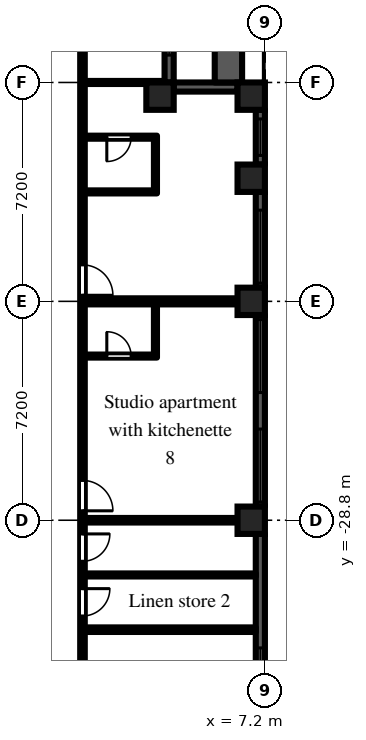
"""IFC4 building model, lengths in metres.
Left out: names, types, materials, properties, quantities, classifications, styles, units other than length and angle.
Written with IfcOpenShell. Run it as: python <this file> out.ifc"""

import sys

from ifc_helpers import new_model, si_unit, direction, frame, frame_2d, origin, origin_2d, place, context, subcontext, project, spatial, rectangle, extrude, element, fill, save


model = new_model("IFC4")
c1 = context("Model", 3, precision=1e-05, world=origin(), true_north=direction((0.0, 1.0)))
c2 = subcontext(c1, "Body", "Model", "MODEL_VIEW")
j1 = project(units=[si_unit("LENGTHUNIT", "METRE"), si_unit("PLANEANGLEUNIT", "RADIAN")], contexts=[c1])
p1 = place(None, origin())
s1 = spatial("IfcSite", under=j1, at=p1, CompositionType="ELEMENT")
p2 = place(p1, origin())
s2 = spatial("IfcBuilding", under=s1, at=p2, CompositionType="ELEMENT")
p3 = place(p2, frame((0.0, 0.0, 35.7)))
s3 = spatial("IfcBuildingStorey", under=s2, at=p3, CompositionType="ELEMENT", Elevation=35.7)
for number, where, z_axis, x_axis in (
    (1, (3.75, -14.85, 0.0), (0.0, 0.0, 1.0), (1.0, 0.0, 0.0)),
    (2, (6.75, -28.8, 0.0), (0.0, 0.0, 1.0), (1.0, 0.0, 0.0)),
    (3, (6.75, -21.6, 0.0), (0.0, 0.0, 1.0), (1.0, 0.0, 0.0)),
    (4, (6.75, -17.55, 0.0), (0.0, 0.0, 1.0), (1.0, 0.0, 0.0)),
    (5, (6.75, -14.85, 0.0), (0.0, 0.0, 1.0), (1.0, 0.0, 0.0)),
):
    element("IfcColumn", number, at=place(p3, frame(where, z_axis=z_axis, x_axis=x_axis)), inside=s3, PredefinedType="COLUMN", context=c2, shape_type="SweptSolid", body=[
        extrude(rectangle(XDim=0.9, YDim=0.9, at=origin_2d()), origin(), (0.0, 0.0, 1.0), 3.0),
    ])
p4 = place(p3, frame((7.05, -35.55, 0.0), z_axis=(0.0, 0.0, 1.0), x_axis=(0.0, 1.0, 0.0)))
e6 = element("IfcWall", 6, at=p4, inside=s3, PredefinedType="SOLIDWALL", context=c2, shape_type="SweptSolid", body=[
    extrude(rectangle(XDim=6.3, YDim=0.3, at=frame_2d((3.15, 0.0))), origin(), (0.0, 0.0, 1.0), 2.1),
])
p5 = place(p4, frame((0.15, 0.0, 0.2)))
e7 = element("IfcOpeningElement", 7, at=p5, cuts=e6, PredefinedType="OPENING", context=c2, shape_type="SweptSolid", body=[
    extrude(rectangle(XDim=2.4, YDim=1.85, at=frame_2d((1.2, 0.925))), frame((0.0, 0.16, 0.0), z_axis=(0.0, -1.0, 0.0), x_axis=(1.0, 0.0, 0.0)), (0.0, 0.0, 1.0), 0.32),
])
p6 = place(p3, frame((7.05, -28.35, 0.0), z_axis=(0.0, 0.0, 1.0), x_axis=(0.0, 1.0, 0.0)))
e8 = element("IfcWall", 8, at=p6, inside=s3, PredefinedType="SOLIDWALL", context=c2, shape_type="SweptSolid", body=[
    extrude(rectangle(XDim=6.3, YDim=0.3, at=frame_2d((3.15, 0.0))), origin(), (0.0, 0.0, 1.0), 2.1),
])
p7 = place(p6, frame((0.15, 0.0, 0.2)))
e9 = element("IfcOpeningElement", 9, at=p7, cuts=e8, PredefinedType="OPENING", context=c2, shape_type="SweptSolid", body=[
    extrude(rectangle(XDim=2.4, YDim=1.85, at=frame_2d((1.2, 0.925))), frame((0.0, 0.16, 0.0), z_axis=(0.0, -1.0, 0.0), x_axis=(1.0, 0.0, 0.0)), (0.0, 0.0, 1.0), 0.32),
])
p8 = place(p6, frame((3.75, 0.0, 0.2)))
e10 = element("IfcOpeningElement", 10, at=p8, cuts=e8, PredefinedType="OPENING", context=c2, shape_type="SweptSolid", body=[
    extrude(rectangle(XDim=2.4, YDim=1.85, at=frame_2d((1.2, 0.925))), frame((0.0, 0.16, 0.0), z_axis=(0.0, -1.0, 0.0), x_axis=(1.0, 0.0, 0.0)), (0.0, 0.0, 1.0), 0.32),
])
p9 = place(p3, frame((7.05, -21.15, 0.0), z_axis=(0.0, 0.0, 1.0), x_axis=(0.0, 1.0, 0.0)))
e11 = element("IfcWall", 11, at=p9, inside=s3, PredefinedType="SOLIDWALL", context=c2, shape_type="SweptSolid", body=[
    extrude(rectangle(XDim=3.15, YDim=0.3, at=frame_2d((1.575, 0.0))), origin(), (0.0, 0.0, 1.0), 2.1),
])
p10 = place(p9, frame((0.15, 0.0, 0.2)))
e12 = element("IfcOpeningElement", 12, at=p10, cuts=e11, PredefinedType="OPENING", context=c2, shape_type="SweptSolid", body=[
    extrude(rectangle(XDim=2.4, YDim=1.85, at=frame_2d((1.2, 0.925))), frame((0.0, 0.16, 0.0), z_axis=(0.0, -1.0, 0.0), x_axis=(1.0, 0.0, 0.0)), (0.0, 0.0, 1.0), 0.32),
])
p11 = place(p3, frame((7.05, -17.1, 0.0), z_axis=(0.0, 0.0, 1.0), x_axis=(0.0, 1.0, 0.0)))
e13 = element("IfcWall", 13, at=p11, inside=s3, PredefinedType="SOLIDWALL", context=c2, shape_type="SweptSolid", body=[
    extrude(rectangle(XDim=1.8, YDim=0.3, at=frame_2d((0.9, 0.0))), origin(), (0.0, 0.0, 1.0), 2.1),
])
p12 = place(p11, frame((0.3, 0.0, 0.2)))
e14 = element("IfcOpeningElement", 14, at=p12, cuts=e13, PredefinedType="OPENING", context=c2, shape_type="SweptSolid", body=[
    extrude(rectangle(XDim=1.2, YDim=1.85, at=frame_2d((0.6, 0.925))), frame((0.0, 0.16, 0.0), z_axis=(0.0, -1.0, 0.0), x_axis=(1.0, 0.0, 0.0)), (0.0, 0.0, 1.0), 0.32),
])
p13 = place(p3, frame((6.3, -14.55, 0.0), z_axis=(0.0, 0.0, 1.0), x_axis=(-1.0, 0.0, 0.0)))
e15 = element("IfcWall", 15, at=p13, inside=s3, PredefinedType="SOLIDWALL", context=c2, shape_type="SweptSolid", body=[
    extrude(rectangle(XDim=2.1, YDim=0.3, at=frame_2d((1.05, 0.0))), origin(), (0.0, 0.0, 1.0), 2.1),
])
p14 = place(p3, frame((4.05, -14.4, 0.0), z_axis=(0.0, 0.0, 1.0), x_axis=(0.0, 1.0, 0.0)))
e16 = element("IfcWall", 16, at=p14, inside=s3, PredefinedType="SOLIDWALL", context=c2, shape_type="SweptSolid", body=[
    extrude(rectangle(XDim=7.2, YDim=0.3, at=frame_2d((3.6, 0.0))), origin(), (0.0, 0.0, 1.0), 2.1),
])
p15 = place(p14, frame((3.0, 0.0, 0.0)))
e17 = element("IfcOpeningElement", 17, at=p15, cuts=e16, PredefinedType="OPENING", context=c2, shape_type="SweptSolid", body=[
    extrude(rectangle(XDim=1.2, YDim=2.05, at=frame_2d((0.6, 1.025))), frame((0.0, 0.16, 0.0), z_axis=(0.0, -1.0, 0.0), x_axis=(1.0, 0.0, 0.0)), (0.0, 0.0, 1.0), 0.32),
])
p16 = place(p14, frame((0.9, 0.0, 0.2)))
e18 = element("IfcOpeningElement", 18, at=p16, cuts=e16, PredefinedType="OPENING", context=c2, shape_type="SweptSolid", body=[
    extrude(rectangle(XDim=1.8, YDim=1.85, at=frame_2d((0.9, 0.925))), frame((0.0, 0.16, 0.0), z_axis=(0.0, -1.0, 0.0), x_axis=(1.0, 0.0, 0.0)), (0.0, 0.0, 1.0), 0.32),
])
p17 = place(p14, frame((4.5, 0.0, 0.2)))
e19 = element("IfcOpeningElement", 19, at=p17, cuts=e16, PredefinedType="OPENING", context=c2, shape_type="SweptSolid", body=[
    extrude(rectangle(XDim=1.8, YDim=1.85, at=frame_2d((0.9, 0.925))), frame((0.0, 0.16, 0.0), z_axis=(0.0, -1.0, 0.0), x_axis=(1.0, 0.0, 0.0)), (0.0, 0.0, 1.0), 0.32),
])
p18 = place(p3, frame((6.0, -14.4, 0.0), z_axis=(0.0, 0.0, 1.0), x_axis=(0.0, 1.0, 0.0)))
e20 = element("IfcWall", 20, at=p18, inside=s3, PredefinedType="PARAPET", context=c2, shape_type="SweptSolid", body=[
    extrude(rectangle(XDim=7.2, YDim=0.9, at=frame_2d((3.6, 0.0))), origin(), (0.0, 0.0, 1.0), 0.8),
])
p19 = place(p3, frame((1.2, -36.5, 0.0), z_axis=(0.0, 0.0, 1.0), x_axis=(0.0, 1.0, 0.0)))
e21 = element("IfcWall", 21, at=p19, inside=s3, PredefinedType="PARTITIONING", context=c2, shape_type="SweptSolid", body=[
    extrude(rectangle(XDim=35.375, YDim=0.15, at=frame_2d((17.688, 0.0))), origin(), (0.0, 0.0, 1.0), 2.575),
])
p20 = place(p19, frame((31.85, 0.0, 0.0)))
e22 = element("IfcOpeningElement", 22, at=p20, cuts=e21, PredefinedType="OPENING", context=c2, shape_type="SweptSolid", body=[
    extrude(rectangle(XDim=0.9, YDim=2.1, at=frame_2d((0.45, 1.05))), frame((0.0, 0.085, 0.0), z_axis=(0.0, -1.0, 0.0), x_axis=(1.0, 0.0, 0.0)), (0.0, 0.0, 1.0), 0.17),
])
p21 = place(p19, frame((27.45, 0.0, 0.0)))
e23 = element("IfcOpeningElement", 23, at=p21, cuts=e21, PredefinedType="OPENING", context=c2, shape_type="SweptSolid", body=[
    extrude(rectangle(XDim=0.9, YDim=2.1, at=frame_2d((0.45, 1.05))), frame((0.0, 0.085, 0.0), z_axis=(0.0, -1.0, 0.0), x_axis=(1.0, 0.0, 0.0)), (0.0, 0.0, 1.0), 0.17),
])
p22 = place(p19, frame((23.85, 0.0, 0.0)))
e24 = element("IfcOpeningElement", 24, at=p22, cuts=e21, PredefinedType="OPENING", context=c2, shape_type="SweptSolid", body=[
    extrude(rectangle(XDim=0.9, YDim=2.1, at=frame_2d((0.45, 1.05))), frame((0.0, 0.085, 0.0), z_axis=(0.0, -1.0, 0.0), x_axis=(1.0, 0.0, 0.0)), (0.0, 0.0, 1.0), 0.17),
])
p23 = place(p19, frame((15.1, 0.0, 0.0)))
e25 = element("IfcOpeningElement", 25, at=p23, cuts=e21, PredefinedType="OPENING", context=c2, shape_type="SweptSolid", body=[
    extrude(rectangle(XDim=1.0, YDim=2.1, at=frame_2d((0.5, 1.05))), frame((0.0, 0.085, 0.0), z_axis=(0.0, -1.0, 0.0), x_axis=(1.0, 0.0, 0.0)), (0.0, 0.0, 1.0), 0.17),
])
p24 = place(p19, frame((8.01, 0.0, 0.0)))
e26 = element("IfcOpeningElement", 26, at=p24, cuts=e21, PredefinedType="OPENING", context=c2, shape_type="SweptSolid", body=[
    extrude(rectangle(XDim=1.0, YDim=2.1, at=frame_2d((0.5, 1.05))), frame((0.0, 0.085, 0.0), z_axis=(0.0, -1.0, 0.0), x_axis=(1.0, 0.0, 0.0)), (0.0, 0.0, 1.0), 0.17),
])
p25 = place(p19, frame((6.35, 0.0, 0.0)))
e27 = element("IfcOpeningElement", 27, at=p25, cuts=e21, PredefinedType="OPENING", context=c2, shape_type="SweptSolid", body=[
    extrude(rectangle(XDim=0.9, YDim=2.1, at=frame_2d((0.45, 1.05))), frame((0.0, 0.085, 0.0), z_axis=(0.0, -1.0, 0.0), x_axis=(1.0, 0.0, 0.0)), (0.0, 0.0, 1.0), 0.17),
])
p26 = place(p19, frame((4.55, 0.0, 0.0)))
e28 = element("IfcOpeningElement", 28, at=p26, cuts=e21, PredefinedType="OPENING", context=c2, shape_type="SweptSolid", body=[
    extrude(rectangle(XDim=0.9, YDim=2.1, at=frame_2d((0.45, 1.05))), frame((0.0, 0.085, 0.0), z_axis=(0.0, -1.0, 0.0), x_axis=(1.0, 0.0, 0.0)), (0.0, 0.0, 1.0), 0.17),
])
p27 = place(p19, frame((1.15, 0.0, 0.0)))
e29 = element("IfcOpeningElement", 29, at=p27, cuts=e21, PredefinedType="OPENING", context=c2, shape_type="SweptSolid", body=[
    extrude(rectangle(XDim=1.8, YDim=2.1, at=frame_2d((0.9, 1.05))), frame((0.0, 0.085, 0.0), z_axis=(0.0, -1.0, 0.0), x_axis=(1.0, 0.0, 0.0)), (0.0, 0.0, 1.0), 0.17),
])
p28 = place(p3, frame((1.275, -32.4, 0.0), z_axis=(0.0, 0.0, 1.0), x_axis=(1.0, 0.0, 0.0)))
e30 = element("IfcWall", 30, at=p28, inside=s3, PredefinedType="PARTITIONING", context=c2, shape_type="SweptSolid", body=[
    extrude(rectangle(XDim=5.625, YDim=0.15, at=frame_2d((2.812, 0.0))), origin(), (0.0, 0.0, 1.0), 2.575),
])
p29 = place(p3, frame((1.275, -30.6, 0.0), z_axis=(0.0, 0.0, 1.0), x_axis=(1.0, 0.0, 0.0)))
e31 = element("IfcWall", 31, at=p29, inside=s3, PredefinedType="PARTITIONING", context=c2, shape_type="SweptSolid", body=[
    extrude(rectangle(XDim=5.625, YDim=0.1, at=frame_2d((2.812, 0.0))), origin(), (0.0, 0.0, 1.0), 2.575),
])
p30 = place(p3, frame((1.275, -28.8, 0.0), z_axis=(0.0, 0.0, 1.0), x_axis=(1.0, 0.0, 0.0)))
e32 = element("IfcWall", 32, at=p30, inside=s3, PredefinedType="PARTITIONING", context=c2, shape_type="SweptSolid", body=[
    extrude(rectangle(XDim=5.625, YDim=0.15, at=frame_2d((2.812, 0.0))), origin(), (0.0, 0.0, 1.0), 2.575),
])
p31 = place(p3, frame((1.275, -23.4, 0.0), z_axis=(0.0, 0.0, 1.0), x_axis=(1.0, 0.0, 0.0)))
e33 = element("IfcWall", 33, at=p31, inside=s3, PredefinedType="PARTITIONING", context=c2, shape_type="SweptSolid", body=[
    extrude(rectangle(XDim=2.375, YDim=0.1, at=frame_2d((1.188, 0.0))), origin(), (0.0, 0.0, 1.0), 2.575),
])
p32 = place(p31, frame((0.725, 0.0, 0.0)))
e34 = element("IfcOpeningElement", 34, at=p32, cuts=e33, PredefinedType="OPENING", context=c2, shape_type="SweptSolid", body=[
    extrude(rectangle(XDim=0.8, YDim=2.1, at=frame_2d((0.4, 1.05))), frame((0.0, 0.06, 0.0), z_axis=(0.0, -1.0, 0.0), x_axis=(1.0, 0.0, 0.0)), (0.0, 0.0, 1.0), 0.12),
])
p33 = place(p3, frame((1.275, -21.6, 0.0), z_axis=(0.0, 0.0, 1.0), x_axis=(1.0, 0.0, 0.0)))
e35 = element("IfcWall", 35, at=p33, inside=s3, PredefinedType="PARTITIONING", context=c2, shape_type="SweptSolid", body=[
    extrude(rectangle(XDim=5.625, YDim=0.2, at=frame_2d((2.812, 0.0))), origin(), (0.0, 0.0, 1.0), 2.575),
])
p34 = place(p3, frame((1.275, -18.0, 0.0), z_axis=(0.0, 0.0, 1.0), x_axis=(1.0, 0.0, 0.0)))
e36 = element("IfcWall", 36, at=p34, inside=s3, PredefinedType="PARTITIONING", context=c2, shape_type="SweptSolid", body=[
    extrude(rectangle(XDim=2.375, YDim=0.1, at=frame_2d((1.188, 0.0))), origin(), (0.0, 0.0, 1.0), 2.575),
])
p35 = place(p3, frame((1.275, -16.2, 0.0), z_axis=(0.0, 0.0, 1.0), x_axis=(1.0, 0.0, 0.0)))
e37 = element("IfcWall", 37, at=p35, inside=s3, PredefinedType="PARTITIONING", context=c2, shape_type="SweptSolid", body=[
    extrude(rectangle(XDim=2.375, YDim=0.1, at=frame_2d((1.188, 0.0))), origin(), (0.0, 0.0, 1.0), 2.575),
])
p36 = place(p35, frame((0.725, 0.0, 0.0)))
e38 = element("IfcOpeningElement", 38, at=p36, cuts=e37, PredefinedType="OPENING", context=c2, shape_type="SweptSolid", body=[
    extrude(rectangle(XDim=0.8, YDim=2.1, at=frame_2d((0.4, 1.05))), frame((0.0, 0.06, 0.0), z_axis=(0.0, -1.0, 0.0), x_axis=(1.0, 0.0, 0.0)), (0.0, 0.0, 1.0), 0.12),
])
p37 = place(p3, frame((1.275, -14.4, 0.0), z_axis=(0.0, 0.0, 1.0), x_axis=(1.0, 0.0, 0.0)))
e39 = element("IfcWall", 39, at=p37, inside=s3, PredefinedType="PARTITIONING", context=c2, shape_type="SweptSolid", body=[
    extrude(rectangle(XDim=2.625, YDim=0.1, at=frame_2d((1.312, 0.0))), origin(), (0.0, 0.0, 1.0), 2.575),
])
p38 = place(p3, frame((3.6, -23.35, 0.0), z_axis=(0.0, 0.0, 1.0), x_axis=(0.0, 1.0, 0.0)))
e40 = element("IfcWall", 40, at=p38, inside=s3, PredefinedType="PARTITIONING", context=c2, shape_type="SweptSolid", body=[
    extrude(rectangle(XDim=1.65, YDim=0.1, at=frame_2d((0.825, 0.0))), origin(), (0.0, 0.0, 1.0), 2.575),
])
p39 = place(p3, frame((3.6, -17.95, 0.0), z_axis=(0.0, 0.0, 1.0), x_axis=(0.0, 1.0, 0.0)))
e41 = element("IfcWall", 41, at=p39, inside=s3, PredefinedType="PARTITIONING", context=c2, shape_type="SweptSolid", body=[
    extrude(rectangle(XDim=1.7, YDim=0.1, at=frame_2d((0.85, 0.0))), origin(), (0.0, 0.0, 1.0), 2.575),
])
p40 = place(p5, origin())
e42 = element("IfcWindow", 42, at=p40, inside=s3, PartitioningType="SINGLE_PANEL", PredefinedType="WINDOW", context=c2, shape_type="SweptSolid", body=[
    extrude(rectangle(XDim=2.4, YDim=1.85, at=frame_2d((1.2, 0.925))), frame((0.0, 0.03, 0.0), z_axis=(0.0, -1.0, 0.0), x_axis=(1.0, 0.0, 0.0)), (0.0, 0.0, 1.0), 0.06),
])
fill(e7, e42)
p41 = place(p7, origin())
e43 = element("IfcWindow", 43, at=p41, inside=s3, PartitioningType="SINGLE_PANEL", PredefinedType="WINDOW", context=c2, shape_type="SweptSolid", body=[
    extrude(rectangle(XDim=2.4, YDim=1.85, at=frame_2d((1.2, 0.925))), frame((0.0, 0.03, 0.0), z_axis=(0.0, -1.0, 0.0), x_axis=(1.0, 0.0, 0.0)), (0.0, 0.0, 1.0), 0.06),
])
fill(e9, e43)
p42 = place(p8, origin())
e44 = element("IfcWindow", 44, at=p42, inside=s3, PartitioningType="SINGLE_PANEL", PredefinedType="WINDOW", context=c2, shape_type="SweptSolid", body=[
    extrude(rectangle(XDim=2.4, YDim=1.85, at=frame_2d((1.2, 0.925))), frame((0.0, 0.03, 0.0), z_axis=(0.0, -1.0, 0.0), x_axis=(1.0, 0.0, 0.0)), (0.0, 0.0, 1.0), 0.06),
])
fill(e10, e44)
p43 = place(p10, origin())
e45 = element("IfcWindow", 45, at=p43, inside=s3, PartitioningType="SINGLE_PANEL", PredefinedType="WINDOW", context=c2, shape_type="SweptSolid", body=[
    extrude(rectangle(XDim=2.4, YDim=1.85, at=frame_2d((1.2, 0.925))), frame((0.0, 0.03, 0.0), z_axis=(0.0, -1.0, 0.0), x_axis=(1.0, 0.0, 0.0)), (0.0, 0.0, 1.0), 0.06),
])
fill(e12, e45)
p44 = place(p12, origin())
e46 = element("IfcWindow", 46, at=p44, inside=s3, PartitioningType="SINGLE_PANEL", PredefinedType="WINDOW", context=c2, shape_type="SweptSolid", body=[
    extrude(rectangle(XDim=1.2, YDim=1.85, at=frame_2d((0.6, 0.925))), frame((0.0, 0.03, 0.0), z_axis=(0.0, -1.0, 0.0), x_axis=(1.0, 0.0, 0.0)), (0.0, 0.0, 1.0), 0.06),
])
fill(e14, e46)
p45 = place(p16, origin())
e47 = element("IfcWindow", 47, at=p45, inside=s3, PartitioningType="SINGLE_PANEL", PredefinedType="WINDOW", context=c2, shape_type="SweptSolid", body=[
    extrude(rectangle(XDim=1.8, YDim=1.85, at=frame_2d((0.9, 0.925))), frame((0.0, 0.03, 0.0), z_axis=(0.0, -1.0, 0.0), x_axis=(1.0, 0.0, 0.0)), (0.0, 0.0, 1.0), 0.06),
])
fill(e18, e47)
p46 = place(p36, frame((0.8, 0.0, 0.0), z_axis=(0.0, 0.0, 1.0), x_axis=(-1.0, 0.0, 0.0)))
e48 = element("IfcDoor", 48, at=p46, inside=s3, OperationType="SINGLE_SWING_RIGHT", PredefinedType="DOOR", context=c2, shape_type="SweptSolid", body=[
    extrude(rectangle(XDim=0.8, YDim=2.1, at=frame_2d((0.4, 1.05))), frame((0.0, 0.025, 0.0), z_axis=(0.0, -1.0, 0.0), x_axis=(1.0, 0.0, 0.0)), (0.0, 0.0, 1.0), 0.05),
])
fill(e38, e48)
p47 = place(p23, frame((1.0, 0.0, 0.0), z_axis=(0.0, 0.0, 1.0), x_axis=(-1.0, 0.0, 0.0)))
e49 = element("IfcDoor", 49, at=p47, inside=s3, OperationType="SINGLE_SWING_RIGHT", PredefinedType="DOOR", context=c2, shape_type="SweptSolid", body=[
    extrude(rectangle(XDim=1.0, YDim=2.1, at=frame_2d((0.5, 1.05))), frame((0.0, 0.025, 0.0), z_axis=(0.0, -1.0, 0.0), x_axis=(1.0, 0.0, 0.0)), (0.0, 0.0, 1.0), 0.05),
])
fill(e25, e49)
p48 = place(p32, origin())
e50 = element("IfcDoor", 50, at=p48, inside=s3, OperationType="SINGLE_SWING_LEFT", PredefinedType="DOOR", context=c2, shape_type="SweptSolid", body=[
    extrude(rectangle(XDim=0.8, YDim=2.1, at=frame_2d((0.4, 1.05))), frame((0.0, 0.025, 0.0), z_axis=(0.0, -1.0, 0.0), x_axis=(1.0, 0.0, 0.0)), (0.0, 0.0, 1.0), 0.05),
])
fill(e34, e50)
p49 = place(p24, frame((1.0, 0.0, 0.0), z_axis=(0.0, 0.0, 1.0), x_axis=(-1.0, 0.0, 0.0)))
e51 = element("IfcDoor", 51, at=p49, inside=s3, OperationType="SINGLE_SWING_RIGHT", PredefinedType="DOOR", context=c2, shape_type="SweptSolid", body=[
    extrude(rectangle(XDim=1.0, YDim=2.1, at=frame_2d((0.5, 1.05))), frame((0.0, 0.025, 0.0), z_axis=(0.0, -1.0, 0.0), x_axis=(1.0, 0.0, 0.0)), (0.0, 0.0, 1.0), 0.05),
])
fill(e26, e51)
p50 = place(p25, frame((0.9, 0.0, 0.0), z_axis=(0.0, 0.0, 1.0), x_axis=(-1.0, 0.0, 0.0)))
e52 = element("IfcDoor", 52, at=p50, inside=s3, OperationType="SINGLE_SWING_LEFT", PredefinedType="DOOR", context=c2, shape_type="SweptSolid", body=[
    extrude(rectangle(XDim=0.9, YDim=2.1, at=frame_2d((0.45, 1.05))), frame((0.0, 0.025, 0.0), z_axis=(0.0, -1.0, 0.0), x_axis=(1.0, 0.0, 0.0)), (0.0, 0.0, 1.0), 0.05),
])
fill(e27, e52)
p51 = place(p26, frame((0.9, 0.0, 0.0), z_axis=(0.0, 0.0, 1.0), x_axis=(-1.0, 0.0, 0.0)))
e53 = element("IfcDoor", 53, at=p51, inside=s3, OperationType="SINGLE_SWING_LEFT", PredefinedType="DOOR", context=c2, shape_type="SweptSolid", body=[
    extrude(rectangle(XDim=0.9, YDim=2.1, at=frame_2d((0.45, 1.05))), frame((0.0, 0.025, 0.0), z_axis=(0.0, -1.0, 0.0), x_axis=(1.0, 0.0, 0.0)), (0.0, 0.0, 1.0), 0.05),
])
fill(e28, e53)
save(model, sys.argv[1])
